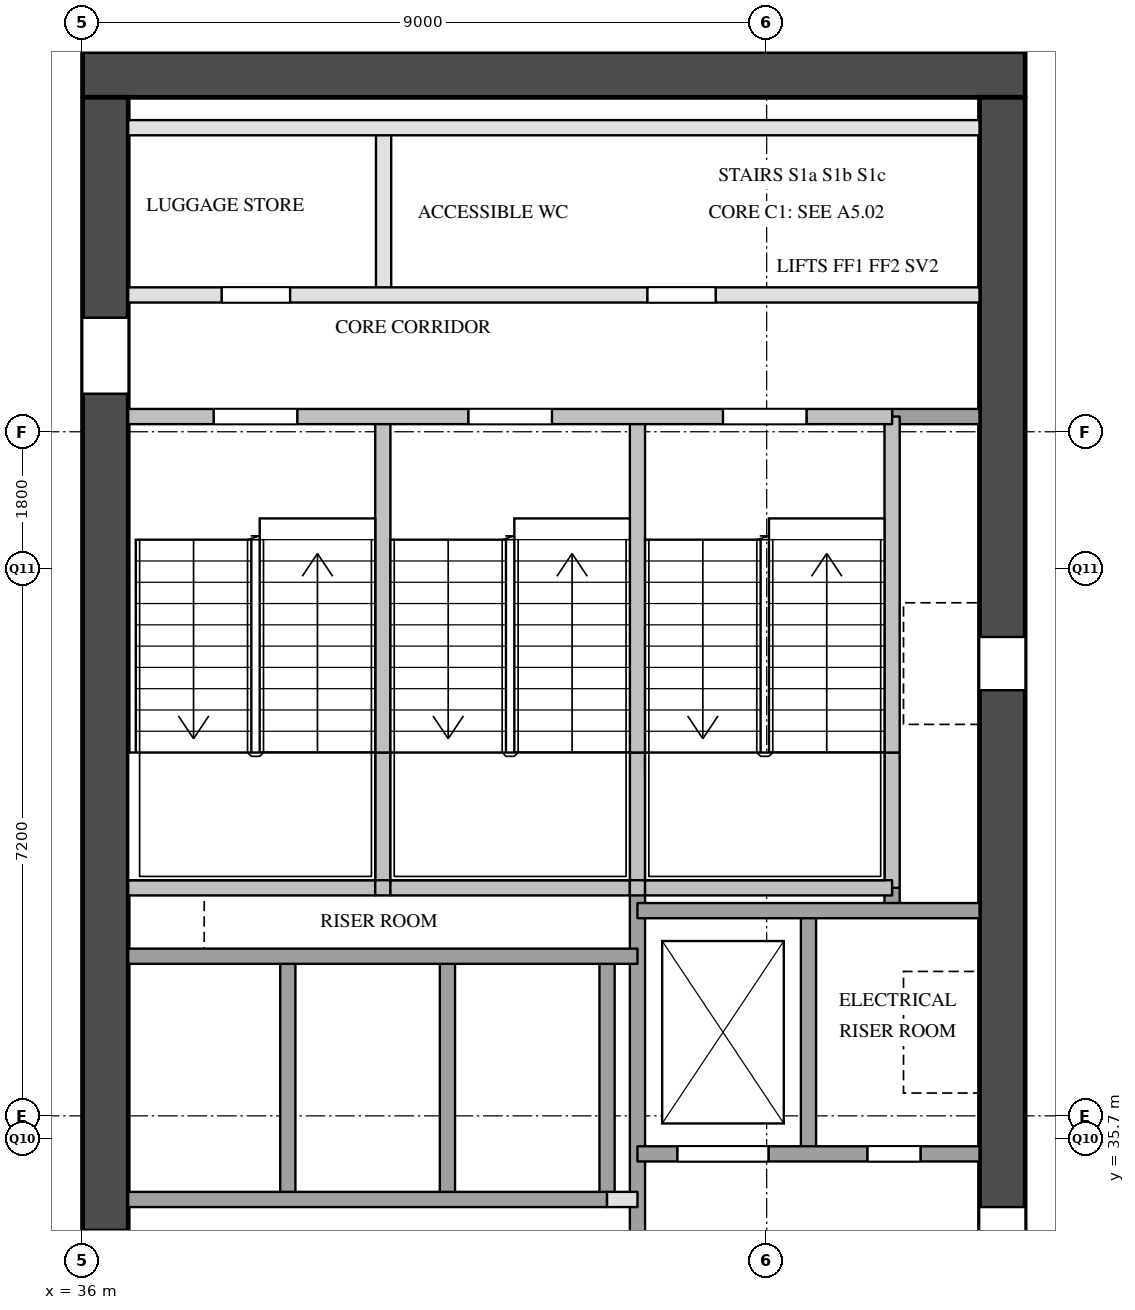
"""IFC4 building model, lengths in metres.
Left out: names, types, materials, properties, quantities, classifications, styles, units other than length and angle.
Written with IfcOpenShell. Run it as: python <this file> out.ifc"""

import sys

from ifc_helpers import new_model, si_unit, direction, frame, frame_2d, origin, place, context, subcontext, project, spatial, rectangle, extrude, element, fill, save


model = new_model("IFC4")
c1 = context("Model", 3, precision=1e-05, world=origin(), true_north=direction((0.0, 1.0)))
c2 = subcontext(c1, "Body", "Model", "MODEL_VIEW")
j1 = project(units=[si_unit("LENGTHUNIT", "METRE"), si_unit("PLANEANGLEUNIT", "RADIAN")], contexts=[c1])
p1 = place(None, origin())
s1 = spatial("IfcSite", under=j1, at=p1, CompositionType="ELEMENT")
p2 = place(p1, origin())
s2 = spatial("IfcBuilding", under=s1, at=p2, CompositionType="ELEMENT")
p3 = place(p2, frame((0.0, 0.0, 100.6)))
s3 = spatial("IfcBuildingStorey", under=s2, at=p3, CompositionType="ELEMENT", Elevation=100.6)
p4 = place(p3, frame((36.0, 49.7, 0.0), z_axis=(0.0, 0.0, 1.0), x_axis=(1.0, 0.0, 0.0)))
e1 = element("IfcWall", 1, at=p4, inside=s3, PredefinedType="SHEAR", context=c2, shape_type="SweptSolid", body=[
    extrude(rectangle(XDim=12.4, YDim=0.6, at=frame_2d((6.2, 0.0))), origin(), (0.0, 0.0, 1.0), 3.5),
])
p5 = place(p3, frame((36.3, 29.1, 0.0), z_axis=(0.0, 0.0, 1.0), x_axis=(0.0, 1.0, 0.0)))
e2 = element("IfcWall", 2, at=p5, inside=s3, PredefinedType="SHEAR", context=c2, shape_type="SweptSolid", body=[
    extrude(rectangle(XDim=20.3, YDim=0.6, at=frame_2d((10.15, 0.0))), origin(), (0.0, 0.0, 1.0), 3.5),
])
p6 = place(p5, frame((3.6, 0.0, 0.0)))
e3 = element("IfcOpeningElement", 3, at=p6, cuts=e2, PredefinedType="OPENING", context=c2, shape_type="SweptSolid", body=[
    extrude(rectangle(XDim=1.8, YDim=2.1, at=frame_2d((0.9, 1.05))), frame((0.0, 0.31, 0.0), z_axis=(0.0, -1.0, 0.0), x_axis=(1.0, 0.0, 0.0)), (0.0, 0.0, 1.0), 0.62),
])
p7 = place(p5, frame((16.4, 0.0, 0.0)))
e4 = element("IfcOpeningElement", 4, at=p7, cuts=e2, PredefinedType="OPENING", context=c2, shape_type="SweptSolid", body=[
    extrude(rectangle(XDim=1.0, YDim=2.1, at=frame_2d((0.5, 1.05))), frame((0.0, 0.31, 0.0), z_axis=(0.0, -1.0, 0.0), x_axis=(1.0, 0.0, 0.0)), (0.0, 0.0, 1.0), 0.62),
])
p8 = place(p3, frame((48.1, 29.1, 0.0), z_axis=(0.0, 0.0, 1.0), x_axis=(0.0, 1.0, 0.0)))
e5 = element("IfcWall", 5, at=p8, inside=s3, PredefinedType="SHEAR", context=c2, shape_type="SweptSolid", body=[
    extrude(rectangle(XDim=20.3, YDim=0.6, at=frame_2d((10.15, 0.0))), origin(), (0.0, 0.0, 1.0), 3.5),
])
p9 = place(p8, frame((12.5, 0.0, 0.0)))
e6 = element("IfcOpeningElement", 6, at=p9, cuts=e5, PredefinedType="OPENING", context=c2, shape_type="SweptSolid", body=[
    extrude(rectangle(XDim=0.7, YDim=2.1, at=frame_2d((0.35, 1.05))), frame((0.0, 0.31, 0.0), z_axis=(0.0, -1.0, 0.0), x_axis=(1.0, 0.0, 0.0)), (0.0, 0.0, 1.0), 0.62),
])
p10 = place(p8, frame((3.9, 0.0, 0.0)))
e7 = element("IfcOpeningElement", 7, at=p10, cuts=e5, PredefinedType="OPENING", context=c2, shape_type="SweptSolid", body=[
    extrude(rectangle(XDim=1.8, YDim=2.1, at=frame_2d((0.9, 1.05))), frame((0.0, 0.31, 0.0), z_axis=(0.0, -1.0, 0.0), x_axis=(1.0, 0.0, 0.0)), (0.0, 0.0, 1.0), 0.62),
])
p11 = place(p3, frame((38.7, 34.9, 0.0), z_axis=(0.0, 0.0, 1.0), x_axis=(0.0, 1.0, 0.0)))
e8 = element("IfcWall", 8, at=p11, inside=s3, PredefinedType="SOLIDWALL", context=c2, shape_type="SweptSolid", body=[
    extrude(rectangle(XDim=3.2, YDim=0.2, at=frame_2d((1.6, 0.0))), origin(), (0.0, 0.0, 1.0), 3.5),
])
p12 = place(p3, frame((39.95, 39.0, 0.0), z_axis=(0.0, 0.0, 1.0), x_axis=(0.0, 1.0, 0.0)))
e9 = element("IfcWall", 9, at=p12, inside=s3, PredefinedType="SOLIDWALL", context=c2, shape_type="SweptSolid", body=[
    extrude(rectangle(XDim=1.78, YDim=0.2, at=frame_2d((0.89, 0.0))), origin(), (0.0, 0.0, 1.0), 3.5),
])
p13 = place(p3, frame((39.95, 40.78, 0.0), z_axis=(0.0, 0.0, 1.0), x_axis=(0.0, 1.0, 0.0)))
e10 = element("IfcWall", 10, at=p13, inside=s3, PredefinedType="SOLIDWALL", context=c2, shape_type="SweptSolid", body=[
    extrude(rectangle(XDim=4.42, YDim=0.2, at=frame_2d((2.21, 0.0))), origin(), (0.0, 0.0, 1.0), 3.5),
])
p14 = place(p3, frame((39.96, 46.8, 0.0), z_axis=(0.0, 0.0, 1.0), x_axis=(0.0, 1.0, 0.0)))
e11 = element("IfcWall", 11, at=p14, inside=s3, PredefinedType="PARTITIONING", context=c2, shape_type="SweptSolid", body=[
    extrude(rectangle(XDim=2.2, YDim=0.2, at=frame_2d((1.1, 0.0))), origin(), (0.0, 0.0, 1.0), 3.5),
])
for number, where, z_axis, x_axis in (
    (12, (40.8, 34.9, 0.0), (0.0, 0.0, 1.0), (0.0, 1.0, 0.0)),
    (13, (42.9, 34.9, 0.0), (0.0, 0.0, 1.0), (0.0, 1.0, 0.0)),
):
    element("IfcWall", number, at=place(p3, frame(where, z_axis=z_axis, x_axis=x_axis)), inside=s3, PredefinedType="SOLIDWALL", context=c2, shape_type="SweptSolid", body=[
        extrude(rectangle(XDim=3.2, YDim=0.2, at=frame_2d((1.6, 0.0))), origin(), (0.0, 0.0, 1.0), 3.5),
    ])
p15 = place(p3, frame((43.3, 29.1, 0.0), z_axis=(0.0, 0.0, 1.0), x_axis=(0.0, 1.0, 0.0)))
e14 = element("IfcWall", 14, at=p15, inside=s3, PredefinedType="SOLIDWALL", context=c2, shape_type="SweptSolid", body=[
    extrude(rectangle(XDim=9.9, YDim=0.2, at=frame_2d((4.95, 0.0))), origin(), (0.0, 0.0, 1.0), 3.5),
])
p16 = place(p3, frame((43.3, 39.0, 0.0), z_axis=(0.0, 0.0, 1.0), x_axis=(0.0, 1.0, 0.0)))
e15 = element("IfcWall", 15, at=p16, inside=s3, PredefinedType="SOLIDWALL", context=c2, shape_type="SweptSolid", body=[
    extrude(rectangle(XDim=1.78, YDim=0.2, at=frame_2d((0.89, 0.0))), origin(), (0.0, 0.0, 1.0), 3.5),
])
p17 = place(p3, frame((43.3, 40.78, 0.0), z_axis=(0.0, 0.0, 1.0), x_axis=(0.0, 1.0, 0.0)))
e16 = element("IfcWall", 16, at=p17, inside=s3, PredefinedType="SOLIDWALL", context=c2, shape_type="SweptSolid", body=[
    extrude(rectangle(XDim=4.42, YDim=0.2, at=frame_2d((2.21, 0.0))), origin(), (0.0, 0.0, 1.0), 3.5),
])
p18 = place(p3, frame((45.55, 35.5, 0.0), z_axis=(0.0, 0.0, 1.0), x_axis=(0.0, 1.0, 0.0)))
e17 = element("IfcWall", 17, at=p18, inside=s3, PredefinedType="SOLIDWALL", context=c2, shape_type="SweptSolid", body=[
    extrude(rectangle(XDim=3.2, YDim=0.2, at=frame_2d((1.6, 0.0))), origin(), (0.0, 0.0, 1.0), 3.5),
])
p19 = place(p3, frame((46.65, 38.7, 0.0), z_axis=(0.0, 0.0, 1.0), x_axis=(0.0, 1.0, 0.0)))
e18 = element("IfcWall", 18, at=p19, inside=s3, PredefinedType="SOLIDWALL", context=c2, shape_type="SweptSolid", body=[
    extrude(rectangle(XDim=0.3, YDim=0.2, at=frame_2d((0.15, 0.0))), origin(), (0.0, 0.0, 1.0), 3.5),
])
p20 = place(p3, frame((46.65, 39.0, 0.0), z_axis=(0.0, 0.0, 1.0), x_axis=(0.0, 1.0, 0.0)))
e19 = element("IfcWall", 19, at=p20, inside=s3, PredefinedType="SOLIDWALL", context=c2, shape_type="SweptSolid", body=[
    extrude(rectangle(XDim=1.78, YDim=0.2, at=frame_2d((0.89, 0.0))), origin(), (0.0, 0.0, 1.0), 3.5),
])
p21 = place(p3, frame((46.65, 40.78, 0.0), z_axis=(0.0, 0.0, 1.0), x_axis=(0.0, 1.0, 0.0)))
e20 = element("IfcWall", 20, at=p21, inside=s3, PredefinedType="SOLIDWALL", context=c2, shape_type="SweptSolid", body=[
    extrude(rectangle(XDim=4.42, YDim=0.2, at=frame_2d((2.21, 0.0))), origin(), (0.0, 0.0, 1.0), 3.5),
])
p22 = place(p3, frame((42.9, 34.9, 0.0), z_axis=(0.0, 0.0, 1.0), x_axis=(1.0, 0.0, 0.0)))
e21 = element("IfcWall", 21, at=p22, inside=s3, PredefinedType="PARTITIONING", context=c2, shape_type="SweptSolid", body=[
    extrude(rectangle(XDim=0.4, YDim=0.2, at=frame_2d((0.2, 0.0))), origin(), (0.0, 0.0, 1.0), 3.5),
])
p23 = place(p3, frame((36.6, 34.9, 0.0), z_axis=(0.0, 0.0, 1.0), x_axis=(1.0, 0.0, 0.0)))
e22 = element("IfcWall", 22, at=p23, inside=s3, PredefinedType="SOLIDWALL", context=c2, shape_type="SweptSolid", body=[
    extrude(rectangle(XDim=6.3, YDim=0.2, at=frame_2d((3.15, 0.0))), origin(), (0.0, 0.0, 1.0), 3.5),
])
p24 = place(p3, frame((43.3, 35.5, 0.0), z_axis=(0.0, 0.0, 1.0), x_axis=(1.0, 0.0, 0.0)))
e23 = element("IfcWall", 23, at=p24, inside=s3, PredefinedType="SOLIDWALL", context=c2, shape_type="SweptSolid", body=[
    extrude(rectangle(XDim=4.5, YDim=0.2, at=frame_2d((2.25, 0.0))), origin(), (0.0, 0.0, 1.0), 3.5),
])
p25 = place(p24, frame((0.525, 0.0, 0.0)))
e24 = element("IfcOpeningElement", 24, at=p25, cuts=e23, PredefinedType="OPENING", context=c2, shape_type="SweptSolid", body=[
    extrude(rectangle(XDim=1.2, YDim=2.1, at=frame_2d((0.6, 1.05))), frame((0.0, 0.11, 0.0), z_axis=(0.0, -1.0, 0.0), x_axis=(1.0, 0.0, 0.0)), (0.0, 0.0, 1.0), 0.22),
])
p26 = place(p24, frame((3.025, 0.0, 0.0)))
e25 = element("IfcOpeningElement", 25, at=p26, cuts=e23, PredefinedType="OPENING", context=c2, shape_type="SweptSolid", body=[
    extrude(rectangle(XDim=0.7, YDim=2.1, at=frame_2d((0.35, 1.05))), frame((0.0, 0.11, 0.0), z_axis=(0.0, -1.0, 0.0), x_axis=(1.0, 0.0, 0.0)), (0.0, 0.0, 1.0), 0.22),
])
p27 = place(p3, frame((36.6, 38.1, 0.0), z_axis=(0.0, 0.0, 1.0), x_axis=(1.0, 0.0, 0.0)))
e26 = element("IfcWall", 26, at=p27, inside=s3, PredefinedType="SOLIDWALL", context=c2, shape_type="SweptSolid", body=[
    extrude(rectangle(XDim=6.7, YDim=0.2, at=frame_2d((3.35, 0.0))), origin(), (0.0, 0.0, 1.0), 3.5),
])
p28 = place(p3, frame((43.3, 38.7, 0.0), z_axis=(0.0, 0.0, 1.0), x_axis=(1.0, 0.0, 0.0)))
e27 = element("IfcWall", 27, at=p28, inside=s3, PredefinedType="SOLIDWALL", context=c2, shape_type="SweptSolid", body=[
    extrude(rectangle(XDim=4.5, YDim=0.2, at=frame_2d((2.25, 0.0))), origin(), (0.0, 0.0, 1.0), 3.5),
])
p29 = place(p3, frame((36.6, 39.0, 0.0), z_axis=(0.0, 0.0, 1.0), x_axis=(1.0, 0.0, 0.0)))
e28 = element("IfcWall", 28, at=p29, inside=s3, PredefinedType="SOLIDWALL", context=c2, shape_type="SweptSolid", body=[
    extrude(rectangle(XDim=3.25, YDim=0.2, at=frame_2d((1.625, 0.0))), origin(), (0.0, 0.0, 1.0), 3.5),
])
p30 = place(p3, frame((39.85, 39.0, 0.0), z_axis=(0.0, 0.0, 1.0), x_axis=(1.0, 0.0, 0.0)))
e29 = element("IfcWall", 29, at=p30, inside=s3, PredefinedType="SOLIDWALL", context=c2, shape_type="SweptSolid", body=[
    extrude(rectangle(XDim=0.2, YDim=0.2, at=frame_2d((0.1, 0.0))), origin(), (0.0, 0.0, 1.0), 3.5),
])
p31 = place(p3, frame((40.05, 39.0, 0.0), z_axis=(0.0, 0.0, 1.0), x_axis=(1.0, 0.0, 0.0)))
e30 = element("IfcWall", 30, at=p31, inside=s3, PredefinedType="SOLIDWALL", context=c2, shape_type="SweptSolid", body=[
    extrude(rectangle(XDim=3.15, YDim=0.2, at=frame_2d((1.575, 0.0))), origin(), (0.0, 0.0, 1.0), 3.5),
])
p32 = place(p3, frame((43.2, 39.0, 0.0), z_axis=(0.0, 0.0, 1.0), x_axis=(1.0, 0.0, 0.0)))
e31 = element("IfcWall", 31, at=p32, inside=s3, PredefinedType="SOLIDWALL", context=c2, shape_type="SweptSolid", body=[
    extrude(rectangle(XDim=0.2, YDim=0.2, at=frame_2d((0.1, 0.0))), origin(), (0.0, 0.0, 1.0), 3.5),
])
p33 = place(p3, frame((43.4, 39.0, 0.0), z_axis=(0.0, 0.0, 1.0), x_axis=(1.0, 0.0, 0.0)))
e32 = element("IfcWall", 32, at=p33, inside=s3, PredefinedType="SOLIDWALL", context=c2, shape_type="SweptSolid", body=[
    extrude(rectangle(XDim=3.25, YDim=0.2, at=frame_2d((1.625, 0.0))), origin(), (0.0, 0.0, 1.0), 3.5),
])
p34 = place(p3, frame((46.65, 45.2, 0.0), z_axis=(0.0, 0.0, 1.0), x_axis=(1.0, 0.0, 0.0)))
e33 = element("IfcWall", 33, at=p34, inside=s3, PredefinedType="SOLIDWALL", context=c2, shape_type="SweptSolid", body=[
    extrude(rectangle(XDim=1.15, YDim=0.2, at=frame_2d((0.575, 0.0))), origin(), (0.0, 0.0, 1.0), 3.5),
])
p35 = place(p3, frame((36.6, 45.2, 0.0), z_axis=(0.0, 0.0, 1.0), x_axis=(1.0, 0.0, 0.0)))
e34 = element("IfcWall", 34, at=p35, inside=s3, PredefinedType="SOLIDWALL", context=c2, shape_type="SweptSolid", body=[
    extrude(rectangle(XDim=10.05, YDim=0.2, at=frame_2d((5.025, 0.0))), origin(), (0.0, 0.0, 1.0), 3.5),
])
p36 = place(p35, frame((1.125, 0.0, 0.0)))
e35 = element("IfcOpeningElement", 35, at=p36, cuts=e34, PredefinedType="OPENING", context=c2, shape_type="SweptSolid", body=[
    extrude(rectangle(XDim=1.1, YDim=2.1, at=frame_2d((0.55, 1.05))), frame((0.0, 0.11, 0.0), z_axis=(0.0, -1.0, 0.0), x_axis=(1.0, 0.0, 0.0)), (0.0, 0.0, 1.0), 0.22),
])
p37 = place(p35, frame((4.475, 0.0, 0.0)))
e36 = element("IfcOpeningElement", 36, at=p37, cuts=e34, PredefinedType="OPENING", context=c2, shape_type="SweptSolid", body=[
    extrude(rectangle(XDim=1.1, YDim=2.1, at=frame_2d((0.55, 1.05))), frame((0.0, 0.11, 0.0), z_axis=(0.0, -1.0, 0.0), x_axis=(1.0, 0.0, 0.0)), (0.0, 0.0, 1.0), 0.22),
])
p38 = place(p35, frame((7.825, 0.0, 0.0)))
e37 = element("IfcOpeningElement", 37, at=p38, cuts=e34, PredefinedType="OPENING", context=c2, shape_type="SweptSolid", body=[
    extrude(rectangle(XDim=1.1, YDim=2.1, at=frame_2d((0.55, 1.05))), frame((0.0, 0.11, 0.0), z_axis=(0.0, -1.0, 0.0), x_axis=(1.0, 0.0, 0.0)), (0.0, 0.0, 1.0), 0.22),
])
p39 = place(p3, frame((36.6, 46.8, 0.0), z_axis=(0.0, 0.0, 1.0), x_axis=(1.0, 0.0, 0.0)))
e38 = element("IfcWall", 38, at=p39, inside=s3, PredefinedType="PARTITIONING", context=c2, shape_type="SweptSolid", body=[
    extrude(rectangle(XDim=11.2, YDim=0.2, at=frame_2d((5.6, 0.0))), origin(), (0.0, 0.0, 1.0), 3.5),
])
p40 = place(p39, frame((1.23, 0.0, 0.0)))
e39 = element("IfcOpeningElement", 39, at=p40, cuts=e38, PredefinedType="OPENING", context=c2, shape_type="SweptSolid", body=[
    extrude(rectangle(XDim=0.9, YDim=2.1, at=frame_2d((0.45, 1.05))), frame((0.0, 0.11, 0.0), z_axis=(0.0, -1.0, 0.0), x_axis=(1.0, 0.0, 0.0)), (0.0, 0.0, 1.0), 0.22),
])
p41 = place(p39, frame((6.83, 0.0, 0.0)))
e40 = element("IfcOpeningElement", 40, at=p41, cuts=e38, PredefinedType="OPENING", context=c2, shape_type="SweptSolid", body=[
    extrude(rectangle(XDim=0.9, YDim=2.1, at=frame_2d((0.45, 1.05))), frame((0.0, 0.11, 0.0), z_axis=(0.0, -1.0, 0.0), x_axis=(1.0, 0.0, 0.0)), (0.0, 0.0, 1.0), 0.22),
])
p42 = place(p3, frame((36.6, 49.0, 0.0), z_axis=(0.0, 0.0, 1.0), x_axis=(1.0, 0.0, 0.0)))
e41 = element("IfcWall", 41, at=p42, inside=s3, PredefinedType="PARTITIONING", context=c2, shape_type="SweptSolid", body=[
    extrude(rectangle(XDim=11.2, YDim=0.2, at=frame_2d((5.6, 0.0))), origin(), (0.0, 0.0, 1.0), 3.5),
])
p43 = place(p25, origin())
e42 = element("IfcDoor", 42, at=p43, inside=s3, OperationType="SLIDING_TO_LEFT", PredefinedType="DOOR", context=c2, shape_type="SweptSolid", body=[
    extrude(rectangle(XDim=1.2, YDim=2.1, at=frame_2d((0.6, 1.05))), frame((0.0, 0.025, 0.0), z_axis=(0.0, -1.0, 0.0), x_axis=(1.0, 0.0, 0.0)), (0.0, 0.0, 1.0), 0.05),
])
fill(e24, e42)
p44 = place(p6, origin())
e43 = element("IfcDoor", 43, at=p44, inside=s3, OperationType="DOUBLE_DOOR_SINGLE_SWING", PredefinedType="DOOR", context=c2, shape_type="SweptSolid", body=[
    extrude(rectangle(XDim=1.8, YDim=2.1, at=frame_2d((0.9, 1.05))), frame((0.0, 0.025, 0.0), z_axis=(0.0, -1.0, 0.0), x_axis=(1.0, 0.0, 0.0)), (0.0, 0.0, 1.0), 0.05),
])
fill(e3, e43)
p45 = place(p36, origin())
e44 = element("IfcDoor", 44, at=p45, inside=s3, OperationType="SINGLE_SWING_LEFT", PredefinedType="DOOR", context=c2, shape_type="SweptSolid", body=[
    extrude(rectangle(XDim=1.1, YDim=2.1, at=frame_2d((0.55, 1.05))), frame((0.0, 0.025, 0.0), z_axis=(0.0, -1.0, 0.0), x_axis=(1.0, 0.0, 0.0)), (0.0, 0.0, 1.0), 0.05),
])
fill(e35, e44)
p46 = place(p37, origin())
e45 = element("IfcDoor", 45, at=p46, inside=s3, OperationType="SINGLE_SWING_RIGHT", PredefinedType="DOOR", context=c2, shape_type="SweptSolid", body=[
    extrude(rectangle(XDim=1.1, YDim=2.1, at=frame_2d((0.55, 1.05))), frame((0.0, 0.025, 0.0), z_axis=(0.0, -1.0, 0.0), x_axis=(1.0, 0.0, 0.0)), (0.0, 0.0, 1.0), 0.05),
])
fill(e36, e45)
p47 = place(p38, origin())
e46 = element("IfcDoor", 46, at=p47, inside=s3, OperationType="SINGLE_SWING_RIGHT", PredefinedType="DOOR", context=c2, shape_type="SweptSolid", body=[
    extrude(rectangle(XDim=1.1, YDim=2.1, at=frame_2d((0.55, 1.05))), frame((0.0, 0.025, 0.0), z_axis=(0.0, -1.0, 0.0), x_axis=(1.0, 0.0, 0.0)), (0.0, 0.0, 1.0), 0.05),
])
fill(e37, e46)
p48 = place(p9, origin())
e47 = element("IfcDoor", 47, at=p48, inside=s3, OperationType="SINGLE_SWING_RIGHT", PredefinedType="DOOR", context=c2, shape_type="SweptSolid", body=[
    extrude(rectangle(XDim=0.7, YDim=2.1, at=frame_2d((0.35, 1.05))), frame((0.0, 0.025, 0.0), z_axis=(0.0, -1.0, 0.0), x_axis=(1.0, 0.0, 0.0)), (0.0, 0.0, 1.0), 0.05),
])
fill(e6, e47)
p49 = place(p10, origin())
e48 = element("IfcDoor", 48, at=p49, inside=s3, OperationType="DOUBLE_DOOR_SINGLE_SWING", PredefinedType="DOOR", context=c2, shape_type="SweptSolid", body=[
    extrude(rectangle(XDim=1.8, YDim=2.1, at=frame_2d((0.9, 1.05))), frame((0.0, 0.025, 0.0), z_axis=(0.0, -1.0, 0.0), x_axis=(1.0, 0.0, 0.0)), (0.0, 0.0, 1.0), 0.05),
])
fill(e7, e48)
p50 = place(p26, origin())
e49 = element("IfcDoor", 49, at=p50, inside=s3, OperationType="SINGLE_SWING_RIGHT", PredefinedType="DOOR", context=c2, shape_type="SweptSolid", body=[
    extrude(rectangle(XDim=0.7, YDim=2.1, at=frame_2d((0.35, 1.05))), frame((0.0, 0.025, 0.0), z_axis=(0.0, -1.0, 0.0), x_axis=(1.0, 0.0, 0.0)), (0.0, 0.0, 1.0), 0.05),
])
fill(e25, e49)
p51 = place(p7, origin())
e50 = element("IfcDoor", 50, at=p51, inside=s3, OperationType="SINGLE_SWING_RIGHT", PredefinedType="DOOR", context=c2, shape_type="SweptSolid", body=[
    extrude(rectangle(XDim=1.0, YDim=2.1, at=frame_2d((0.5, 1.05))), frame((0.0, 0.025, 0.0), z_axis=(0.0, -1.0, 0.0), x_axis=(1.0, 0.0, 0.0)), (0.0, 0.0, 1.0), 0.05),
])
fill(e4, e50)
p52 = place(p40, origin())
e51 = element("IfcDoor", 51, at=p52, inside=s3, OperationType="SINGLE_SWING_LEFT", PredefinedType="DOOR", context=c2, shape_type="SweptSolid", body=[
    extrude(rectangle(XDim=0.9, YDim=2.1, at=frame_2d((0.45, 1.05))), frame((0.0, 0.025, 0.0), z_axis=(0.0, -1.0, 0.0), x_axis=(1.0, 0.0, 0.0)), (0.0, 0.0, 1.0), 0.05),
])
fill(e39, e51)
p53 = place(p41, origin())
e52 = element("IfcDoor", 52, at=p53, inside=s3, OperationType="SINGLE_SWING_RIGHT", PredefinedType="DOOR", context=c2, shape_type="SweptSolid", body=[
    extrude(rectangle(XDim=0.9, YDim=2.1, at=frame_2d((0.45, 1.05))), frame((0.0, 0.025, 0.0), z_axis=(0.0, -1.0, 0.0), x_axis=(1.0, 0.0, 0.0)), (0.0, 0.0, 1.0), 0.05),
])
fill(e40, e52)
save(model, sys.argv[1])
